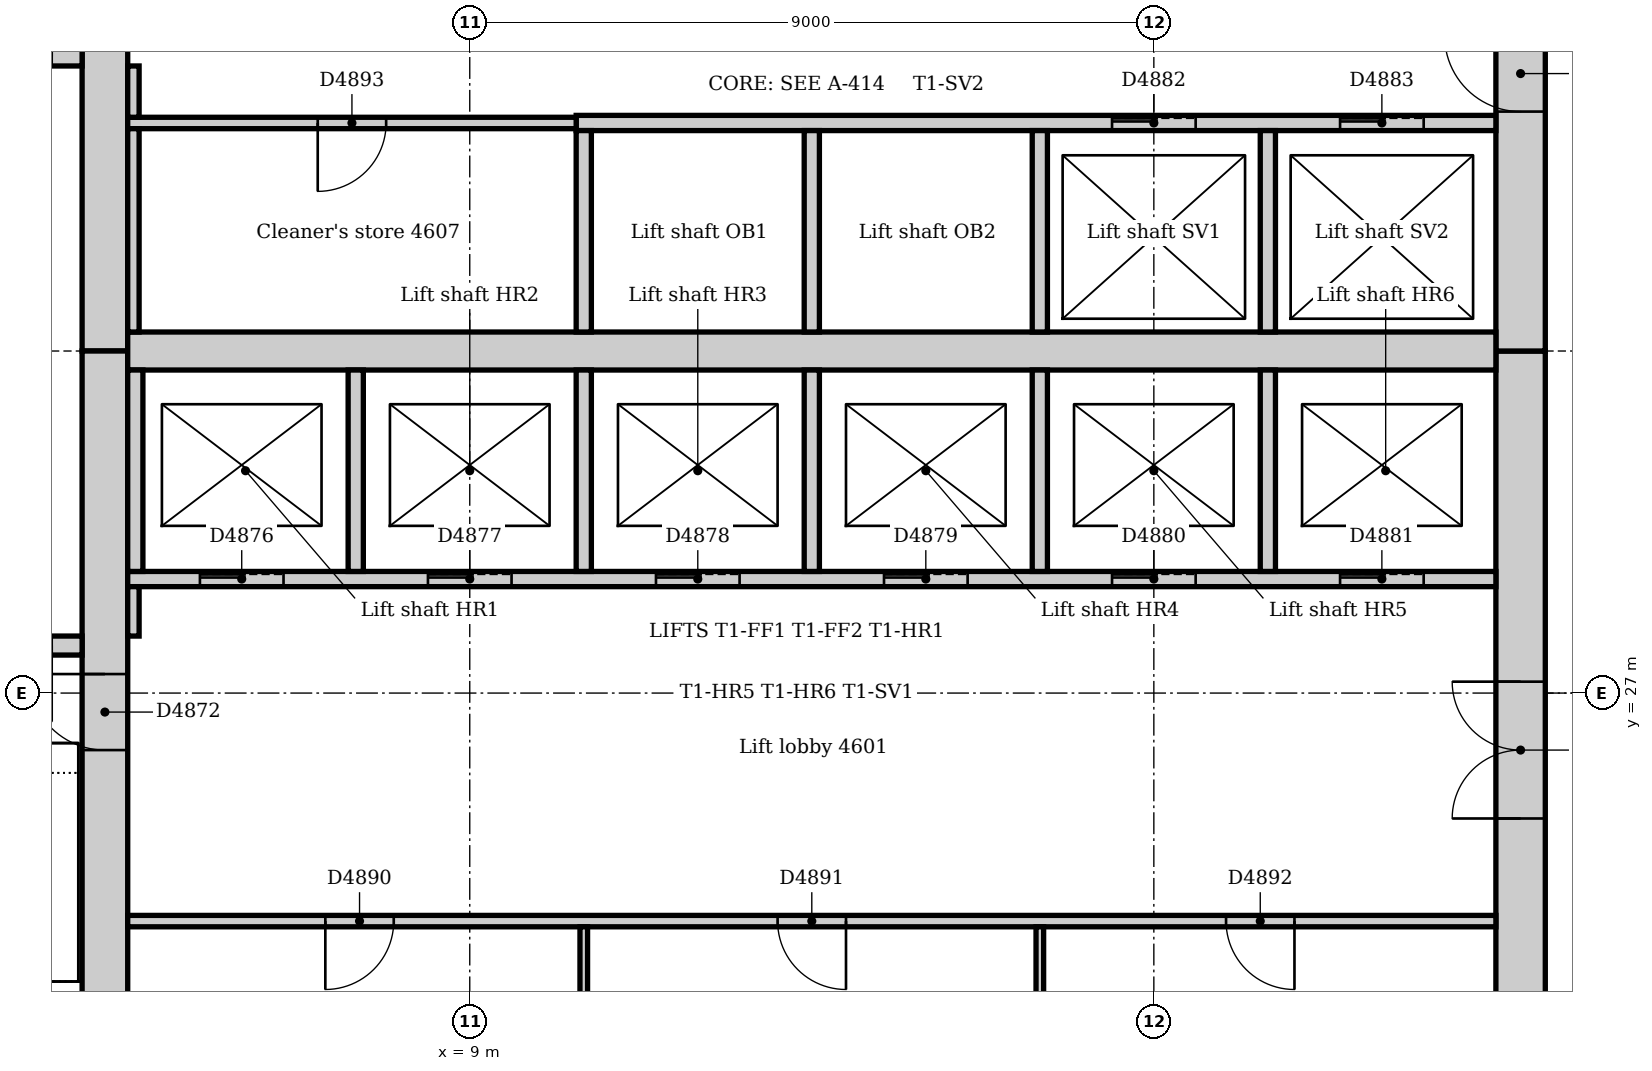
"""IFC4 building model, lengths in metres.
Left out: names, types, materials, properties, quantities, classifications, styles, units other than length and angle.
Written with IfcOpenShell. Run it as: python <this file> out.ifc"""

import sys

from ifc_helpers import new_model, si_unit, direction, frame, frame_2d, origin, place, context, subcontext, project, spatial, rectangle, extrude, element, fill, save


model = new_model("IFC4")
c1 = context("Model", 3, precision=1e-05, world=origin(), true_north=direction((0.0, 1.0)))
c2 = subcontext(c1, "Body", "Model", "MODEL_VIEW")
j1 = project(units=[si_unit("LENGTHUNIT", "METRE"), si_unit("PLANEANGLEUNIT", "RADIAN")], contexts=[c1])
p1 = place(None, origin())
s1 = spatial("IfcSite", under=j1, at=p1, CompositionType="ELEMENT")
p2 = place(p1, origin())
s2 = spatial("IfcBuilding", under=s1, at=p2, CompositionType="ELEMENT")
p3 = place(p2, frame((0.0, 0.0, 193.0)))
s3 = spatial("IfcBuildingStorey", under=s2, at=p3, CompositionType="ELEMENT", Elevation=193.0)
p4 = place(p3, frame((22.825, 21.0, 0.0), z_axis=(0.0, 0.0, 1.0), x_axis=(0.0, 1.0, 0.0)))
e1 = element("IfcWall", 1, at=p4, inside=s3, PredefinedType="SOLIDWALL", context=c2, shape_type="SweptSolid", body=[
    extrude(rectangle(XDim=10.5, YDim=0.65, at=frame_2d((5.25, 0.0))), origin(), (0.0, 0.0, 1.0), 5.0),
])
p5 = place(p4, frame((4.35, 0.0, 0.0)))
e2 = element("IfcOpeningElement", 2, at=p5, cuts=e1, PredefinedType="OPENING", context=c2, shape_type="SweptSolid", body=[
    extrude(rectangle(XDim=1.8, YDim=2.1, at=frame_2d((0.9, 1.05))), frame((0.0, 0.335, 0.0), z_axis=(0.0, -1.0, 0.0), x_axis=(1.0, 0.0, 0.0)), (0.0, 0.0, 1.0), 0.67),
])
p6 = place(p3, frame((22.825, 31.5, 0.0), z_axis=(0.0, 0.0, 1.0), x_axis=(0.0, 1.0, 0.0)))
e3 = element("IfcWall", 3, at=p6, inside=s3, PredefinedType="SOLIDWALL", context=c2, shape_type="SweptSolid", body=[
    extrude(rectangle(XDim=10.5, YDim=0.65, at=frame_2d((5.25, 0.0))), origin(), (0.0, 0.0, 1.0), 5.0),
])
p7 = place(p6, frame((3.15, 0.0, 0.0)))
e4 = element("IfcOpeningElement", 4, at=p7, cuts=e3, PredefinedType="OPENING", context=c2, shape_type="SweptSolid", body=[
    extrude(rectangle(XDim=1.0, YDim=2.1, at=frame_2d((0.5, 1.05))), frame((0.0, 0.335, 0.0), z_axis=(0.0, -1.0, 0.0), x_axis=(1.0, 0.0, 0.0)), (0.0, 0.0, 1.0), 0.67),
])
p8 = place(p6, frame((5.2, 0.0, 0.0)))
e5 = element("IfcOpeningElement", 5, at=p8, cuts=e3, PredefinedType="OPENING", context=c2, shape_type="SweptSolid", body=[
    extrude(rectangle(XDim=1.0, YDim=2.1, at=frame_2d((0.5, 1.05))), frame((0.0, 0.335, 0.0), z_axis=(0.0, -1.0, 0.0), x_axis=(1.0, 0.0, 0.0)), (0.0, 0.0, 1.0), 0.67),
])
p9 = place(p3, frame((4.2, 42.0, 0.0), z_axis=(0.0, 0.0, 1.0), x_axis=(0.0, -1.0, 0.0)))
e6 = element("IfcWall", 6, at=p9, inside=s3, PredefinedType="SOLIDWALL", context=c2, shape_type="SweptSolid", body=[
    extrude(rectangle(XDim=10.5, YDim=0.6, at=frame_2d((5.25, 0.0))), origin(), (0.0, 0.0, 1.0), 5.0),
])
p10 = place(p9, frame((5.3, 0.0, 0.0)))
e7 = element("IfcOpeningElement", 7, at=p10, cuts=e6, PredefinedType="OPENING", context=c2, shape_type="SweptSolid", body=[
    extrude(rectangle(XDim=1.0, YDim=2.1, at=frame_2d((0.5, 1.05))), frame((0.0, 0.31, 0.0), z_axis=(0.0, -1.0, 0.0), x_axis=(1.0, 0.0, 0.0)), (0.0, 0.0, 1.0), 0.62),
])
p11 = place(p3, frame((4.2, 31.5, 0.0), z_axis=(0.0, 0.0, 1.0), x_axis=(0.0, -1.0, 0.0)))
e8 = element("IfcWall", 8, at=p11, inside=s3, PredefinedType="SOLIDWALL", context=c2, shape_type="SweptSolid", body=[
    extrude(rectangle(XDim=10.5, YDim=0.6, at=frame_2d((5.25, 0.0))), origin(), (0.0, 0.0, 1.0), 5.0),
])
p12 = place(p11, frame((4.25, 0.0, 0.0)))
e9 = element("IfcOpeningElement", 9, at=p12, cuts=e8, PredefinedType="OPENING", context=c2, shape_type="SweptSolid", body=[
    extrude(rectangle(XDim=1.0, YDim=2.1, at=frame_2d((0.5, 1.05))), frame((0.0, 0.31, 0.0), z_axis=(0.0, -1.0, 0.0), x_axis=(1.0, 0.0, 0.0)), (0.0, 0.0, 1.0), 0.62),
])
p13 = place(p3, frame((4.5, 31.5, 0.0), z_axis=(0.0, 0.0, 1.0), x_axis=(1.0, 0.0, 0.0)))
e10 = element("IfcWall", 10, at=p13, inside=s3, PredefinedType="SOLIDWALL", context=c2, shape_type="SweptSolid", body=[
    extrude(rectangle(XDim=18.0, YDim=0.5, at=frame_2d((9.0, 0.0))), origin(), (0.0, 0.0, 1.0), 5.0),
])
p14 = place(p3, frame((3.9, 27.625, 0.0), z_axis=(0.0, 0.0, 1.0), x_axis=(-1.0, 0.0, 0.0)))
e11 = element("IfcWall", 11, at=p14, inside=s3, PredefinedType="SOLIDWALL", context=c2, shape_type="SweptSolid", body=[
    extrude(rectangle(XDim=3.54, YDim=0.25, at=frame_2d((1.77, 0.0))), origin(), (0.0, 0.0, 1.0), 5.0),
])
p15 = place(p14, frame((0.4, 0.0, 0.0)))
e12 = element("IfcOpeningElement", 12, at=p15, cuts=e11, PredefinedType="OPENING", context=c2, shape_type="SweptSolid", body=[
    extrude(rectangle(XDim=1.0, YDim=2.1, at=frame_2d((0.5, 1.05))), frame((0.0, 0.135, 0.0), z_axis=(0.0, -1.0, 0.0), x_axis=(1.0, 0.0, 0.0)), (0.0, 0.0, 1.0), 0.27),
])
p16 = place(p3, frame((0.36, 35.375, 0.0), z_axis=(0.0, 0.0, 1.0), x_axis=(1.0, 0.0, 0.0)))
e13 = element("IfcWall", 13, at=p16, inside=s3, PredefinedType="SOLIDWALL", context=c2, shape_type="SweptSolid", body=[
    extrude(rectangle(XDim=3.54, YDim=0.25, at=frame_2d((1.77, 0.0))), origin(), (0.0, 0.0, 1.0), 5.0),
])
p17 = place(p16, frame((2.14, 0.0, 0.0)))
e14 = element("IfcOpeningElement", 14, at=p17, cuts=e13, PredefinedType="OPENING", context=c2, shape_type="SweptSolid", body=[
    extrude(rectangle(XDim=1.0, YDim=2.1, at=frame_2d((0.5, 1.05))), frame((0.0, 0.135, 0.0), z_axis=(0.0, -1.0, 0.0), x_axis=(1.0, 0.0, 0.0)), (0.0, 0.0, 1.0), 0.27),
])
p18 = place(p3, frame((4.5, 28.5, 0.0), z_axis=(0.0, 0.0, 1.0), x_axis=(1.0, 0.0, 0.0)))
e15 = element("IfcWall", 15, at=p18, inside=s3, PredefinedType="PARTITIONING", context=c2, shape_type="SweptSolid", body=[
    extrude(rectangle(XDim=18.0, YDim=0.2, at=frame_2d((9.0, 0.0))), origin(), (0.0, 0.0, 1.0), 4.85),
])
p19 = place(p18, frame((0.95, 0.0, 0.0)))
e16 = element("IfcOpeningElement", 16, at=p19, cuts=e15, PredefinedType="OPENING", context=c2, shape_type="SweptSolid", body=[
    extrude(rectangle(XDim=1.1, YDim=2.1, at=frame_2d((0.55, 1.05))), frame((0.0, 0.11, 0.0), z_axis=(0.0, -1.0, 0.0), x_axis=(1.0, 0.0, 0.0)), (0.0, 0.0, 1.0), 0.22),
])
p20 = place(p18, frame((3.95, 0.0, 0.0)))
e17 = element("IfcOpeningElement", 17, at=p20, cuts=e15, PredefinedType="OPENING", context=c2, shape_type="SweptSolid", body=[
    extrude(rectangle(XDim=1.1, YDim=2.1, at=frame_2d((0.55, 1.05))), frame((0.0, 0.11, 0.0), z_axis=(0.0, -1.0, 0.0), x_axis=(1.0, 0.0, 0.0)), (0.0, 0.0, 1.0), 0.22),
])
p21 = place(p18, frame((6.95, 0.0, 0.0)))
e18 = element("IfcOpeningElement", 18, at=p21, cuts=e15, PredefinedType="OPENING", context=c2, shape_type="SweptSolid", body=[
    extrude(rectangle(XDim=1.1, YDim=2.1, at=frame_2d((0.55, 1.05))), frame((0.0, 0.11, 0.0), z_axis=(0.0, -1.0, 0.0), x_axis=(1.0, 0.0, 0.0)), (0.0, 0.0, 1.0), 0.22),
])
p22 = place(p18, frame((9.95, 0.0, 0.0)))
e19 = element("IfcOpeningElement", 19, at=p22, cuts=e15, PredefinedType="OPENING", context=c2, shape_type="SweptSolid", body=[
    extrude(rectangle(XDim=1.1, YDim=2.1, at=frame_2d((0.55, 1.05))), frame((0.0, 0.11, 0.0), z_axis=(0.0, -1.0, 0.0), x_axis=(1.0, 0.0, 0.0)), (0.0, 0.0, 1.0), 0.22),
])
p23 = place(p18, frame((12.95, 0.0, 0.0)))
e20 = element("IfcOpeningElement", 20, at=p23, cuts=e15, PredefinedType="OPENING", context=c2, shape_type="SweptSolid", body=[
    extrude(rectangle(XDim=1.1, YDim=2.1, at=frame_2d((0.55, 1.05))), frame((0.0, 0.11, 0.0), z_axis=(0.0, -1.0, 0.0), x_axis=(1.0, 0.0, 0.0)), (0.0, 0.0, 1.0), 0.22),
])
p24 = place(p18, frame((15.95, 0.0, 0.0)))
e21 = element("IfcOpeningElement", 21, at=p24, cuts=e15, PredefinedType="OPENING", context=c2, shape_type="SweptSolid", body=[
    extrude(rectangle(XDim=1.1, YDim=2.1, at=frame_2d((0.55, 1.05))), frame((0.0, 0.11, 0.0), z_axis=(0.0, -1.0, 0.0), x_axis=(1.0, 0.0, 0.0)), (0.0, 0.0, 1.0), 0.22),
])
p25 = place(p3, frame((10.4, 34.5, 0.0), z_axis=(0.0, 0.0, 1.0), x_axis=(1.0, 0.0, 0.0)))
e22 = element("IfcWall", 22, at=p25, inside=s3, PredefinedType="PARTITIONING", context=c2, shape_type="SweptSolid", body=[
    extrude(rectangle(XDim=12.1, YDim=0.2, at=frame_2d((6.05, 0.0))), origin(), (0.0, 0.0, 1.0), 4.85),
])
p26 = place(p25, frame((7.05, 0.0, 0.0)))
e23 = element("IfcOpeningElement", 23, at=p26, cuts=e22, PredefinedType="OPENING", context=c2, shape_type="SweptSolid", body=[
    extrude(rectangle(XDim=1.1, YDim=2.1, at=frame_2d((0.55, 1.05))), frame((0.0, 0.11, 0.0), z_axis=(0.0, -1.0, 0.0), x_axis=(1.0, 0.0, 0.0)), (0.0, 0.0, 1.0), 0.22),
])
p27 = place(p25, frame((10.05, 0.0, 0.0)))
e24 = element("IfcOpeningElement", 24, at=p27, cuts=e22, PredefinedType="OPENING", context=c2, shape_type="SweptSolid", body=[
    extrude(rectangle(XDim=1.1, YDim=2.1, at=frame_2d((0.55, 1.05))), frame((0.0, 0.11, 0.0), z_axis=(0.0, -1.0, 0.0), x_axis=(1.0, 0.0, 0.0)), (0.0, 0.0, 1.0), 0.22),
])
for number, where, z_axis, x_axis in (
    (25, (10.5, 28.6, 0.0), (0.0, 0.0, 1.0), (0.0, 1.0, 0.0)),
    (26, (10.5, 31.75, 0.0), (0.0, 0.0, 1.0), (0.0, 1.0, 0.0)),
    (27, (13.5, 28.6, 0.0), (0.0, 0.0, 1.0), (0.0, 1.0, 0.0)),
    (28, (13.5, 31.75, 0.0), (0.0, 0.0, 1.0), (0.0, 1.0, 0.0)),
    (29, (16.5, 28.6, 0.0), (0.0, 0.0, 1.0), (0.0, 1.0, 0.0)),
    (30, (16.5, 31.75, 0.0), (0.0, 0.0, 1.0), (0.0, 1.0, 0.0)),
    (31, (19.5, 28.6, 0.0), (0.0, 0.0, 1.0), (0.0, 1.0, 0.0)),
    (32, (19.5, 31.75, 0.0), (0.0, 0.0, 1.0), (0.0, 1.0, 0.0)),
    (33, (4.6, 28.6, 0.0), (0.0, 0.0, 1.0), (0.0, 1.0, 0.0)),
    (34, (7.5, 28.6, 0.0), (0.0, 0.0, 1.0), (0.0, 1.0, 0.0)),
):
    element("IfcWall", number, at=place(p3, frame(where, z_axis=z_axis, x_axis=x_axis)), inside=s3, PredefinedType="PARTITIONING", context=c2, shape_type="SweptSolid", body=[
        extrude(rectangle(XDim=2.65, YDim=0.2, at=frame_2d((1.325, 0.0))), origin(), (0.0, 0.0, 1.0), 4.85),
    ])
p28 = place(p3, frame((4.5, 24.0, 0.0), z_axis=(0.0, 0.0, 1.0), x_axis=(1.0, 0.0, 0.0)))
e35 = element("IfcWall", 35, at=p28, inside=s3, PredefinedType="PARTITIONING", context=c2, shape_type="SweptSolid", body=[
    extrude(rectangle(XDim=18.0, YDim=0.15, at=frame_2d((9.0, 0.0))), origin(), (0.0, 0.0, 1.0), 4.85),
])
p29 = place(p28, frame((2.6, 0.0, 0.0)))
e36 = element("IfcOpeningElement", 36, at=p29, cuts=e35, PredefinedType="OPENING", context=c2, shape_type="SweptSolid", body=[
    extrude(rectangle(XDim=0.9, YDim=2.1, at=frame_2d((0.45, 1.05))), frame((0.0, 0.085, 0.0), z_axis=(0.0, -1.0, 0.0), x_axis=(1.0, 0.0, 0.0)), (0.0, 0.0, 1.0), 0.17),
])
p30 = place(p28, frame((8.55, 0.0, 0.0)))
e37 = element("IfcOpeningElement", 37, at=p30, cuts=e35, PredefinedType="OPENING", context=c2, shape_type="SweptSolid", body=[
    extrude(rectangle(XDim=0.9, YDim=2.1, at=frame_2d((0.45, 1.05))), frame((0.0, 0.085, 0.0), z_axis=(0.0, -1.0, 0.0), x_axis=(1.0, 0.0, 0.0)), (0.0, 0.0, 1.0), 0.17),
])
p31 = place(p28, frame((14.45, 0.0, 0.0)))
e38 = element("IfcOpeningElement", 38, at=p31, cuts=e35, PredefinedType="OPENING", context=c2, shape_type="SweptSolid", body=[
    extrude(rectangle(XDim=0.9, YDim=2.1, at=frame_2d((0.45, 1.05))), frame((0.0, 0.085, 0.0), z_axis=(0.0, -1.0, 0.0), x_axis=(1.0, 0.0, 0.0)), (0.0, 0.0, 1.0), 0.17),
])
p32 = place(p3, frame((4.5, 34.5, 0.0), z_axis=(0.0, 0.0, 1.0), x_axis=(1.0, 0.0, 0.0)))
e39 = element("IfcWall", 39, at=p32, inside=s3, PredefinedType="PARTITIONING", context=c2, shape_type="SweptSolid", body=[
    extrude(rectangle(XDim=5.9, YDim=0.15, at=frame_2d((2.95, 0.0))), origin(), (0.0, 0.0, 1.0), 4.85),
])
p33 = place(p32, frame((2.5, 0.0, 0.0)))
e40 = element("IfcOpeningElement", 40, at=p33, cuts=e39, PredefinedType="OPENING", context=c2, shape_type="SweptSolid", body=[
    extrude(rectangle(XDim=0.9, YDim=2.1, at=frame_2d((0.45, 1.05))), frame((0.0, 0.085, 0.0), z_axis=(0.0, -1.0, 0.0), x_axis=(1.0, 0.0, 0.0)), (0.0, 0.0, 1.0), 0.17),
])
p34 = place(p3, frame((4.575, 34.575, 0.0), z_axis=(0.0, 0.0, 1.0), x_axis=(0.0, 1.0, 0.0)))
e41 = element("IfcWall", 41, at=p34, inside=s3, PredefinedType="PARTITIONING", context=c2, shape_type="SweptSolid", body=[
    extrude(rectangle(XDim=0.675, YDim=0.15, at=frame_2d((0.338, 0.0))), origin(), (0.0, 0.0, 1.0), 4.85),
])
p35 = place(p3, frame((4.575, 31.75, 0.0), z_axis=(0.0, 0.0, 1.0), x_axis=(0.0, 1.0, 0.0)))
e42 = element("IfcWall", 42, at=p35, inside=s3, PredefinedType="PARTITIONING", context=c2, shape_type="SweptSolid", body=[
    extrude(rectangle(XDim=2.675, YDim=0.15, at=frame_2d((1.337, 0.0))), origin(), (0.0, 0.0, 1.0), 4.85),
])
p36 = place(p3, frame((4.575, 27.75, 0.0), z_axis=(0.0, 0.0, 1.0), x_axis=(0.0, 1.0, 0.0)))
e43 = element("IfcWall", 43, at=p36, inside=s3, PredefinedType="PARTITIONING", context=c2, shape_type="SweptSolid", body=[
    extrude(rectangle(XDim=0.65, YDim=0.15, at=frame_2d((0.325, 0.0))), origin(), (0.0, 0.0, 1.0), 4.85),
])
for number, where, z_axis, x_axis in (
    (44, (10.5, 21.0, 0.0), (0.0, 0.0, 1.0), (0.0, 1.0, 0.0)),
    (45, (16.5, 21.0, 0.0), (0.0, 0.0, 1.0), (0.0, 1.0, 0.0)),
):
    element("IfcWall", number, at=place(p3, frame(where, z_axis=z_axis, x_axis=x_axis)), inside=s3, PredefinedType="PARTITIONING", context=c2, shape_type="SweptSolid", body=[
        extrude(rectangle(XDim=2.925, YDim=0.1, at=frame_2d((1.462, 0.0))), origin(), (0.0, 0.0, 1.0), 4.85),
    ])
p37 = place(p12, frame((1.0, 0.0, 0.0), z_axis=(0.0, 0.0, 1.0), x_axis=(-1.0, 0.0, 0.0)))
e46 = element("IfcDoor", 46, at=p37, inside=s3, OperationType="SINGLE_SWING_RIGHT", PredefinedType="DOOR", context=c2, shape_type="SweptSolid", body=[
    extrude(rectangle(XDim=1.0, YDim=2.1, at=frame_2d((0.5, 1.05))), frame((0.0, 0.025, 0.0), z_axis=(0.0, -1.0, 0.0), x_axis=(1.0, 0.0, 0.0)), (0.0, 0.0, 1.0), 0.05),
])
fill(e9, e46)
p38 = place(p19, origin())
e47 = element("IfcDoor", 47, at=p38, inside=s3, OperationType="SLIDING_TO_LEFT", PredefinedType="DOOR", context=c2, shape_type="SweptSolid", body=[
    extrude(rectangle(XDim=1.1, YDim=2.1, at=frame_2d((0.55, 1.05))), frame((0.0, 0.025, 0.0), z_axis=(0.0, -1.0, 0.0), x_axis=(1.0, 0.0, 0.0)), (0.0, 0.0, 1.0), 0.05),
])
fill(e16, e47)
p39 = place(p20, origin())
e48 = element("IfcDoor", 48, at=p39, inside=s3, OperationType="SLIDING_TO_LEFT", PredefinedType="DOOR", context=c2, shape_type="SweptSolid", body=[
    extrude(rectangle(XDim=1.1, YDim=2.1, at=frame_2d((0.55, 1.05))), frame((0.0, 0.025, 0.0), z_axis=(0.0, -1.0, 0.0), x_axis=(1.0, 0.0, 0.0)), (0.0, 0.0, 1.0), 0.05),
])
fill(e17, e48)
p40 = place(p21, origin())
e49 = element("IfcDoor", 49, at=p40, inside=s3, OperationType="SLIDING_TO_LEFT", PredefinedType="DOOR", context=c2, shape_type="SweptSolid", body=[
    extrude(rectangle(XDim=1.1, YDim=2.1, at=frame_2d((0.55, 1.05))), frame((0.0, 0.025, 0.0), z_axis=(0.0, -1.0, 0.0), x_axis=(1.0, 0.0, 0.0)), (0.0, 0.0, 1.0), 0.05),
])
fill(e18, e49)
p41 = place(p22, origin())
e50 = element("IfcDoor", 50, at=p41, inside=s3, OperationType="SLIDING_TO_LEFT", PredefinedType="DOOR", context=c2, shape_type="SweptSolid", body=[
    extrude(rectangle(XDim=1.1, YDim=2.1, at=frame_2d((0.55, 1.05))), frame((0.0, 0.025, 0.0), z_axis=(0.0, -1.0, 0.0), x_axis=(1.0, 0.0, 0.0)), (0.0, 0.0, 1.0), 0.05),
])
fill(e19, e50)
p42 = place(p23, origin())
e51 = element("IfcDoor", 51, at=p42, inside=s3, OperationType="SLIDING_TO_LEFT", PredefinedType="DOOR", context=c2, shape_type="SweptSolid", body=[
    extrude(rectangle(XDim=1.1, YDim=2.1, at=frame_2d((0.55, 1.05))), frame((0.0, 0.025, 0.0), z_axis=(0.0, -1.0, 0.0), x_axis=(1.0, 0.0, 0.0)), (0.0, 0.0, 1.0), 0.05),
])
fill(e20, e51)
p43 = place(p24, origin())
e52 = element("IfcDoor", 52, at=p43, inside=s3, OperationType="SLIDING_TO_LEFT", PredefinedType="DOOR", context=c2, shape_type="SweptSolid", body=[
    extrude(rectangle(XDim=1.1, YDim=2.1, at=frame_2d((0.55, 1.05))), frame((0.0, 0.025, 0.0), z_axis=(0.0, -1.0, 0.0), x_axis=(1.0, 0.0, 0.0)), (0.0, 0.0, 1.0), 0.05),
])
fill(e21, e52)
p44 = place(p26, origin())
e53 = element("IfcDoor", 53, at=p44, inside=s3, OperationType="SLIDING_TO_LEFT", PredefinedType="DOOR", context=c2, shape_type="SweptSolid", body=[
    extrude(rectangle(XDim=1.1, YDim=2.1, at=frame_2d((0.55, 1.05))), frame((0.0, 0.025, 0.0), z_axis=(0.0, -1.0, 0.0), x_axis=(1.0, 0.0, 0.0)), (0.0, 0.0, 1.0), 0.05),
])
fill(e23, e53)
p45 = place(p27, origin())
e54 = element("IfcDoor", 54, at=p45, inside=s3, OperationType="SLIDING_TO_LEFT", PredefinedType="DOOR", context=c2, shape_type="SweptSolid", body=[
    extrude(rectangle(XDim=1.1, YDim=2.1, at=frame_2d((0.55, 1.05))), frame((0.0, 0.025, 0.0), z_axis=(0.0, -1.0, 0.0), x_axis=(1.0, 0.0, 0.0)), (0.0, 0.0, 1.0), 0.05),
])
fill(e24, e54)
p46 = place(p5, origin())
e55 = element("IfcDoor", 55, at=p46, inside=s3, OperationType="DOUBLE_DOOR_DOUBLE_SWING", PredefinedType="DOOR", context=c2, shape_type="SweptSolid", body=[
    extrude(rectangle(XDim=1.8, YDim=2.1, at=frame_2d((0.9, 1.05))), frame((0.0, 0.025, 0.0), z_axis=(0.0, -1.0, 0.0), x_axis=(1.0, 0.0, 0.0)), (0.0, 0.0, 1.0), 0.05),
])
fill(e2, e55)
p47 = place(p7, origin())
e56 = element("IfcDoor", 56, at=p47, inside=s3, OperationType="SINGLE_SWING_RIGHT", PredefinedType="DOOR", context=c2, shape_type="SweptSolid", body=[
    extrude(rectangle(XDim=1.0, YDim=2.1, at=frame_2d((0.5, 1.05))), frame((0.0, 0.025, 0.0), z_axis=(0.0, -1.0, 0.0), x_axis=(1.0, 0.0, 0.0)), (0.0, 0.0, 1.0), 0.05),
])
fill(e4, e56)
p48 = place(p29, frame((0.9, 0.0, 0.0), z_axis=(0.0, 0.0, 1.0), x_axis=(-1.0, 0.0, 0.0)))
e57 = element("IfcDoor", 57, at=p48, inside=s3, OperationType="SINGLE_SWING_RIGHT", PredefinedType="DOOR", context=c2, shape_type="SweptSolid", body=[
    extrude(rectangle(XDim=0.9, YDim=2.1, at=frame_2d((0.45, 1.05))), frame((0.0, 0.025, 0.0), z_axis=(0.0, -1.0, 0.0), x_axis=(1.0, 0.0, 0.0)), (0.0, 0.0, 1.0), 0.05),
])
fill(e36, e57)
p49 = place(p30, frame((0.9, 0.0, 0.0), z_axis=(0.0, 0.0, 1.0), x_axis=(-1.0, 0.0, 0.0)))
e58 = element("IfcDoor", 58, at=p49, inside=s3, OperationType="SINGLE_SWING_LEFT", PredefinedType="DOOR", context=c2, shape_type="SweptSolid", body=[
    extrude(rectangle(XDim=0.9, YDim=2.1, at=frame_2d((0.45, 1.05))), frame((0.0, 0.025, 0.0), z_axis=(0.0, -1.0, 0.0), x_axis=(1.0, 0.0, 0.0)), (0.0, 0.0, 1.0), 0.05),
])
fill(e37, e58)
p50 = place(p31, frame((0.9, 0.0, 0.0), z_axis=(0.0, 0.0, 1.0), x_axis=(-1.0, 0.0, 0.0)))
e59 = element("IfcDoor", 59, at=p50, inside=s3, OperationType="SINGLE_SWING_LEFT", PredefinedType="DOOR", context=c2, shape_type="SweptSolid", body=[
    extrude(rectangle(XDim=0.9, YDim=2.1, at=frame_2d((0.45, 1.05))), frame((0.0, 0.025, 0.0), z_axis=(0.0, -1.0, 0.0), x_axis=(1.0, 0.0, 0.0)), (0.0, 0.0, 1.0), 0.05),
])
fill(e38, e59)
p51 = place(p33, frame((0.9, 0.0, 0.0), z_axis=(0.0, 0.0, 1.0), x_axis=(-1.0, 0.0, 0.0)))
e60 = element("IfcDoor", 60, at=p51, inside=s3, OperationType="SINGLE_SWING_RIGHT", PredefinedType="DOOR", context=c2, shape_type="SweptSolid", body=[
    extrude(rectangle(XDim=0.9, YDim=2.1, at=frame_2d((0.45, 1.05))), frame((0.0, 0.025, 0.0), z_axis=(0.0, -1.0, 0.0), x_axis=(1.0, 0.0, 0.0)), (0.0, 0.0, 1.0), 0.05),
])
fill(e40, e60)
save(model, sys.argv[1])
